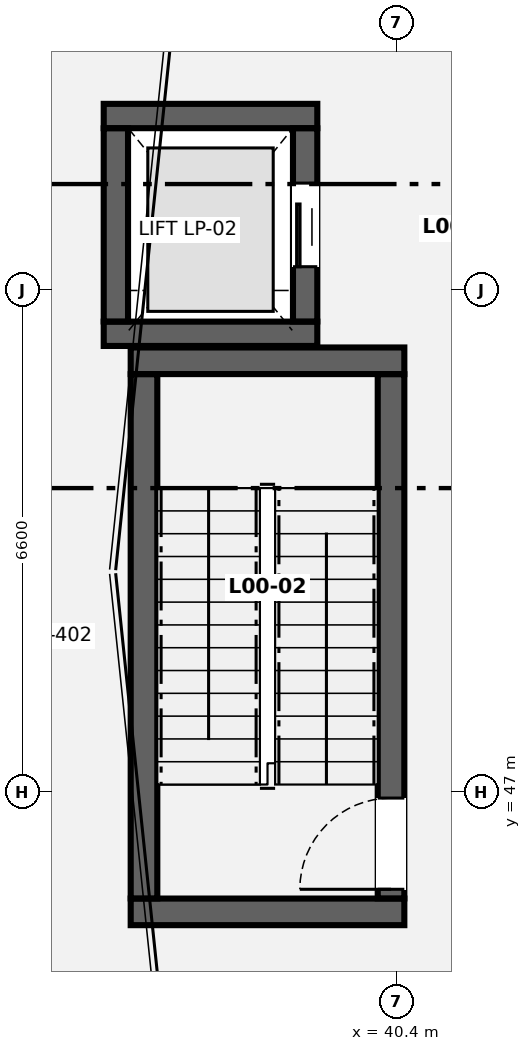
"""IFC4 building model, lengths in metres.
Left out: names, types, materials, properties, quantities, classifications, styles, units other than length and angle.
Written with IfcOpenShell. Run it as: python <this file> out.ifc"""

import sys

from ifc_helpers import new_model, si_unit, direction, frame, frame_2d, origin, place, context, subcontext, project, spatial, rectangle, extrude, element, fill, save


model = new_model("IFC4")
c1 = context("Model", 3, precision=1e-05, world=origin(), true_north=direction((0.0, 1.0)))
c2 = subcontext(c1, "Body", "Model", "MODEL_VIEW")
j1 = project(units=[si_unit("LENGTHUNIT", "METRE"), si_unit("PLANEANGLEUNIT", "RADIAN")], contexts=[c1])
p1 = place(None, origin())
s1 = spatial("IfcSite", under=j1, at=p1, CompositionType="ELEMENT")
p2 = place(p1, origin())
s2 = spatial("IfcBuilding", under=s1, at=p2, CompositionType="ELEMENT")
p3 = place(p2, origin())
s3 = spatial("IfcBuildingStorey", under=s2, at=p3, CompositionType="ELEMENT", Elevation=0.0)
for number, where, z_axis, x_axis in (
    (1, (36.9, 45.425, 0.0), (0.0, 0.0, 1.0), (1.0, 0.0, 0.0)),
    (2, (36.9, 52.675, 0.0), (0.0, 0.0, 1.0), (1.0, 0.0, 0.0)),
):
    element("IfcWall", number, at=place(p3, frame(where, z_axis=z_axis, x_axis=x_axis)), inside=s3, PredefinedType="SHEAR", context=c2, shape_type="SweptSolid", body=[
        extrude(rectangle(XDim=3.6, YDim=0.35, at=frame_2d((1.8, 0.0))), origin(), (0.0, 0.0, 1.0), 4.7),
    ])
p4 = place(p3, frame((37.075, 45.602, 0.0), z_axis=(0.0, 0.0, 1.0), x_axis=(0.0, 1.0, 0.0)))
e3 = element("IfcWall", 3, at=p4, inside=s3, PredefinedType="SHEAR", context=c2, shape_type="SweptSolid", body=[
    extrude(rectangle(XDim=6.896, YDim=0.35, at=frame_2d((3.448, 0.0))), origin(), (0.0, 0.0, 1.0), 4.7),
])
p5 = place(p3, frame((40.325, 45.602, 0.0), z_axis=(0.0, 0.0, 1.0), x_axis=(0.0, 1.0, 0.0)))
e4 = element("IfcWall", 4, at=p5, inside=s3, PredefinedType="SHEAR", context=c2, shape_type="SweptSolid", body=[
    extrude(rectangle(XDim=6.896, YDim=0.35, at=frame_2d((3.448, 0.0))), origin(), (0.0, 0.0, 1.0), 4.7),
])
p6 = place(p5, frame((0.12, 0.0, 0.0)))
e5 = element("IfcOpeningElement", 5, at=p6, cuts=e4, PredefinedType="OPENING", context=c2, shape_type="SweptSolid", body=[
    extrude(rectangle(XDim=1.2, YDim=2.15, at=frame_2d((0.6, 1.075))), frame((0.0, 0.185, 0.0), z_axis=(0.0, -1.0, 0.0), x_axis=(1.0, 0.0, 0.0)), (0.0, 0.0, 1.0), 0.37),
])
for number, where, z_axis, x_axis in (
    (6, (36.545, 53.03, 0.0), (0.0, 0.0, 1.0), (1.0, 0.0, 0.0)),
    (7, (36.545, 55.895, 0.0), (0.0, 0.0, 1.0), (1.0, 0.0, 0.0)),
):
    element("IfcWall", number, at=place(p3, frame(where, z_axis=z_axis, x_axis=x_axis)), inside=s3, PredefinedType="SHEAR", context=c2, shape_type="SweptSolid", body=[
        extrude(rectangle(XDim=2.81, YDim=0.32, at=frame_2d((1.405, 0.0))), origin(), (0.0, 0.0, 1.0), 4.7),
    ])
p7 = place(p3, frame((36.705, 53.192, 0.0), z_axis=(0.0, 0.0, 1.0), x_axis=(0.0, 1.0, 0.0)))
e8 = element("IfcWall", 8, at=p7, inside=s3, PredefinedType="SHEAR", context=c2, shape_type="SweptSolid", body=[
    extrude(rectangle(XDim=2.541, YDim=0.32, at=frame_2d((1.271, 0.0))), origin(), (0.0, 0.0, 1.0), 4.7),
])
p8 = place(p3, frame((39.195, 53.192, 0.0), z_axis=(0.0, 0.0, 1.0), x_axis=(0.0, 1.0, 0.0)))
e9 = element("IfcWall", 9, at=p8, inside=s3, PredefinedType="SHEAR", context=c2, shape_type="SweptSolid", body=[
    extrude(rectangle(XDim=2.541, YDim=0.32, at=frame_2d((1.271, 0.0))), origin(), (0.0, 0.0, 1.0), 4.7),
])
p9 = place(p8, frame((0.72, 0.0, 0.0)))
e10 = element("IfcOpeningElement", 10, at=p9, cuts=e9, PredefinedType="OPENING", context=c2, shape_type="SweptSolid", body=[
    extrude(rectangle(XDim=1.1, YDim=2.15, at=frame_2d((0.55, 1.075))), frame((0.0, 0.17, 0.0), z_axis=(0.0, -1.0, 0.0), x_axis=(1.0, 0.0, 0.0)), (0.0, 0.0, 1.0), 0.34),
])
p10 = place(p6, origin())
e11 = element("IfcDoor", 11, at=p10, inside=s3, OperationType="SINGLE_SWING_LEFT", PredefinedType="DOOR", context=c2, shape_type="SweptSolid", body=[
    extrude(rectangle(XDim=1.2, YDim=2.15, at=frame_2d((0.6, 1.075))), frame((0.0, 0.025, 0.0), z_axis=(0.0, -1.0, 0.0), x_axis=(1.0, 0.0, 0.0)), (0.0, 0.0, 1.0), 0.05),
])
fill(e5, e11)
p11 = place(p9, origin())
e12 = element("IfcDoor", 12, at=p11, inside=s3, OperationType="SLIDING_TO_LEFT", PredefinedType="DOOR", context=c2, shape_type="SweptSolid", body=[
    extrude(rectangle(XDim=1.1, YDim=2.15, at=frame_2d((0.55, 1.075))), frame((0.0, 0.025, 0.0), z_axis=(0.0, -1.0, 0.0), x_axis=(1.0, 0.0, 0.0)), (0.0, 0.0, 1.0), 0.05),
])
fill(e10, e12)
save(model, sys.argv[1])
